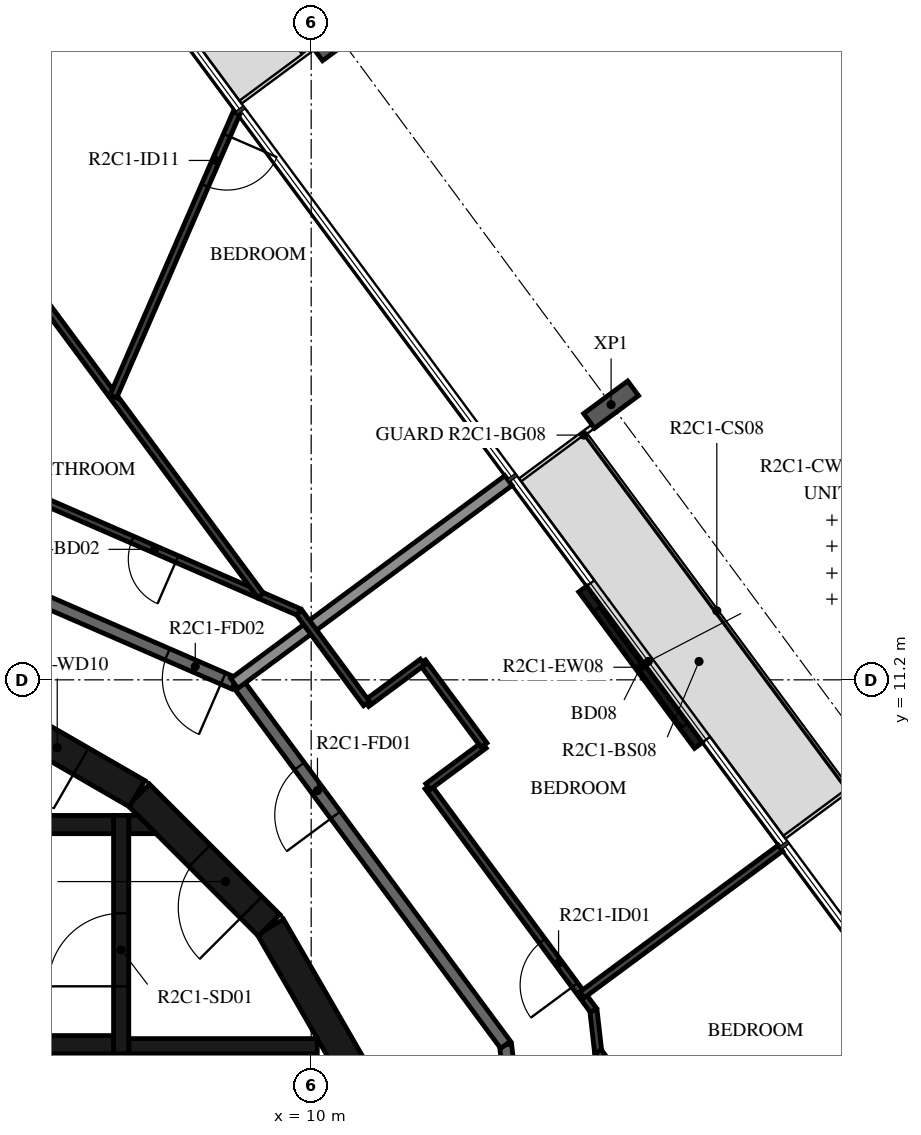
"""IFC4 building model, lengths in metres.
Left out: names, types, materials, properties, quantities, classifications, styles, units other than length and angle.
Written with IfcOpenShell. Run it as: python <this file> out.ifc"""

import sys

from ifc_helpers import new_model, si_unit, direction, frame, frame_2d, origin, origin_2d, place, context, subcontext, project, spatial, polyline, rectangle, i_section, outline, extrude, element, fill, save


model = new_model("IFC4")
c1 = context("Model", 3, precision=1e-05, world=origin(), true_north=direction((0.0, 1.0)))
c2 = subcontext(c1, "Body", "Model", "MODEL_VIEW")
j1 = project(units=[si_unit("LENGTHUNIT", "METRE"), si_unit("PLANEANGLEUNIT", "RADIAN")], contexts=[c1])
p1 = place(None, origin())
s1 = spatial("IfcSite", under=j1, at=p1, CompositionType="ELEMENT")
p2 = place(p1, origin())
s2 = spatial("IfcBuilding", under=s1, at=p2, CompositionType="ELEMENT")
p3 = place(p2, frame((0.0, 0.0, 101.2)))
s3 = spatial("IfcBuildingStorey", under=s2, at=p3, CompositionType="ELEMENT", Elevation=101.2)
for number, where, z_axis, x_axis in (
    (1, (14.932, 15.726, -0.38), (0.0, 0.0, 1.0), (0.595, -0.804, 0.0)),
    (2, (10.46, 21.77, -0.38), (0.0, 0.0, 1.0), (0.595, -0.804, 0.0)),
):
    element("IfcColumn", number, at=place(p3, frame(where, z_axis=z_axis, x_axis=x_axis)), inside=s3, PredefinedType="COLUMN", context=c2, shape_type="SweptSolid", body=[
        extrude(i_section(OverallWidth=0.3, OverallDepth=0.9, WebThickness=0.019, FlangeThickness=0.035, FilletRadius=0.03, at=origin_2d()), origin(), (0.0, 0.0, 1.0), 3.5),
    ])
p4 = place(p3, frame((16.368, 10.121, 0.0), z_axis=(0.0, 0.0, 1.0), x_axis=(-0.594811452818, 0.803865247163, 0.0)))
e3 = element("IfcWall", 3, at=p4, inside=s3, PredefinedType="STANDARD", context=c2, shape_type="SweptSolid", body=[
    extrude(rectangle(XDim=3.2, YDim=0.16, at=frame_2d((1.6, 0.0))), origin(), (0.0, 0.0, 1.0), 3.12),
])
p5 = place(p4, frame((0.4, 0.0, 0.0)))
e4 = element("IfcOpeningElement", 4, at=p5, cuts=e3, PredefinedType="OPENING", context=c2, shape_type="SweptSolid", body=[
    extrude(rectangle(XDim=2.4, YDim=2.4, at=frame_2d((1.2, 1.2))), frame((0.0, 0.09, 0.0), z_axis=(0.0, -1.0, 0.0), x_axis=(1.0, 0.0, 0.0)), (0.0, 0.0, 1.0), 0.18),
])
p6 = place(p3, frame((10.845, 4.51, 0.0), z_axis=(0.0, 0.0, 1.0), x_axis=(-0.500087131594, 0.865975092491, 0.0)))
e5 = element("IfcWall", 5, at=p6, inside=s3, PredefinedType="SHEAR", context=c2, shape_type="SweptSolid", body=[
    extrude(rectangle(XDim=3.033, YDim=0.5, at=frame_2d((1.516, 0.0))), origin(), (0.0, 0.0, 1.0), 3.12),
])
p7 = place(p3, frame((9.308, 7.164, 0.0), z_axis=(0.0, 0.0, 1.0), x_axis=(-0.707106781187, 0.707106781187, 0.0)))
e6 = element("IfcWall", 6, at=p7, inside=s3, PredefinedType="SHEAR", context=c2, shape_type="SweptSolid", body=[
    extrude(rectangle(XDim=3.032, YDim=0.5, at=frame_2d((1.516, 0.0))), origin(), (0.0, 0.0, 1.0), 3.12),
])
p8 = place(p7, frame((0.416, 0.0, 0.0)))
e7 = element("IfcOpeningElement", 7, at=p8, cuts=e6, PredefinedType="OPENING", context=c2, shape_type="SweptSolid", body=[
    extrude(rectangle(XDim=1.2, YDim=2.1, at=frame_2d((0.6, 1.05))), frame((0.0, 0.26, 0.0), z_axis=(0.0, -1.0, 0.0), x_axis=(1.0, 0.0, 0.0)), (0.0, 0.0, 1.0), 0.52),
])
p9 = place(p3, frame((7.137, 9.329, 0.0), z_axis=(0.0, 0.0, 1.0), x_axis=(-0.865975092491, 0.500087131594, 0.0)))
e8 = element("IfcWall", 8, at=p9, inside=s3, PredefinedType="SHEAR", context=c2, shape_type="SweptSolid", body=[
    extrude(rectangle(XDim=3.033, YDim=0.5, at=frame_2d((1.516, 0.0))), origin(), (0.0, 0.0, 1.0), 3.12),
])
p10 = place(p9, frame((1.066, 0.0, 0.0)))
e9 = element("IfcOpeningElement", 9, at=p10, cuts=e8, PredefinedType="OPENING", context=c2, shape_type="SweptSolid", body=[
    extrude(rectangle(XDim=0.9, YDim=2.1, at=frame_2d((0.45, 1.05))), frame((0.0, 0.26, 0.0), z_axis=(0.0, -1.0, 0.0), x_axis=(1.0, 0.0, 0.0)), (0.0, 0.0, 1.0), 0.52),
])
for number, where, z_axis, x_axis in (
    (10, (0.0, 5.2, 0.0), (0.0, 0.0, 1.0), (1.0, 0.0, 0.0)),
    (11, (0.0, 8.82, 0.0), (0.0, 0.0, 1.0), (1.0, 0.0, 0.0)),
):
    element("IfcWall", number, at=place(p3, frame(where, z_axis=z_axis, x_axis=x_axis)), inside=s3, PredefinedType="SHEAR", context=c2, shape_type="SweptSolid", body=[
        extrude(rectangle(XDim=6.75, YDim=0.3, at=frame_2d((3.375, 0.0))), origin(), (0.0, 0.0, 1.0), 3.12),
    ])
p11 = place(p3, frame((6.875, 5.05, 0.0), z_axis=(0.0, 0.0, 1.0), x_axis=(0.0, 1.0, 0.0)))
e12 = element("IfcWall", 12, at=p11, inside=s3, PredefinedType="SHEAR", context=c2, shape_type="SweptSolid", body=[
    extrude(rectangle(XDim=3.92, YDim=0.25, at=frame_2d((1.96, 0.0))), origin(), (0.0, 0.0, 1.0), 3.12),
])
p12 = place(p11, frame((1.11, 0.0, 0.0)))
e13 = element("IfcOpeningElement", 13, at=p12, cuts=e12, PredefinedType="OPENING", context=c2, shape_type="SweptSolid", body=[
    extrude(rectangle(XDim=1.2, YDim=2.1, at=frame_2d((0.6, 1.05))), frame((0.0, 0.135, 0.0), z_axis=(0.0, -1.0, 0.0), x_axis=(1.0, 0.0, 0.0)), (0.0, 0.0, 1.0), 0.27),
])
p13 = place(p3, frame((7.0, 5.175, 0.0), z_axis=(0.0, 0.0, 1.0), x_axis=(1.0, 0.0, 0.0)))
e14 = element("IfcWall", 14, at=p13, inside=s3, PredefinedType="SHEAR", context=c2, shape_type="SweptSolid", body=[
    extrude(rectangle(XDim=3.1, YDim=0.25, at=frame_2d((1.55, 0.0))), origin(), (0.0, 0.0, 1.0), 3.12),
])
p14 = place(p3, origin())
e15 = element("IfcWall", 15, at=p14, inside=s3, PredefinedType="SHEAR", context=c2, shape_type="SweptSolid", body=[
    extrude(outline(polyline([(7.448, 8.67), (7.0, 8.67), (7.0, 8.97), (7.148, 8.97), (7.448, 8.67)])), origin(), (0.0, 0.0, 1.0), 3.12),
])
p15 = place(p3, origin())
e16 = element("IfcWall", 16, at=p15, inside=s3, PredefinedType="SHEAR", context=c2, shape_type="SweptSolid", body=[
    extrude(outline(polyline([(-9.55, 4.8), (-7.65, 4.8), (-7.65, 1.9), (-7.4, 1.9), (-7.4, 4.8), (-5.5, 4.8), (-5.5, 1.9), (-5.25, 1.9), (-5.25, 4.8), (-3.35, 4.8), (-3.35, 1.9), (-3.1, 1.9), (-3.1, 4.8), (-1.2, 4.8), (-1.2, 1.9), (-0.95, 1.9), (-0.95, 4.8), (0.95, 4.8), (0.95, 1.9), (1.2, 1.9), (1.2, 4.8), (3.1, 4.8), (3.1, 1.9), (3.35, 1.9), (3.35, 4.8), (5.25, 4.8), (5.25, 1.9), (5.5, 1.9), (5.5, 4.8), (7.4, 4.8), (7.4, 1.9), (7.65, 1.9), (7.65, 4.8), (9.55, 4.8), (9.55, 1.9), (9.8, 1.9), (9.8, 4.8), (9.8, 5.05), (-9.8, 5.05), (-9.8, 4.8), (-9.8, 1.9), (-9.55, 1.9), (-9.55, 4.8)])), origin(), (0.0, 0.0, 1.0), 3.12),
])
p16 = place(p3, frame((14.028, -2.096, 0.0), z_axis=(0.0, 0.0, 1.0), x_axis=(-0.113226782163, 0.993569170114, 0.0)))
e17 = element("IfcWall", 17, at=p16, inside=s3, PredefinedType="STANDARD", context=c2, shape_type="SweptSolid", body=[
    extrude(rectangle(XDim=7.342, YDim=0.2, at=frame_2d((3.671, 0.0))), origin(), (0.0, 0.0, 1.0), 3.12),
])
p17 = place(p3, frame((13.196, 5.198, 0.0), z_axis=(0.0, 0.0, 1.0), x_axis=(-0.594805187394, 0.803869883159, 0.0)))
e18 = element("IfcWall", 18, at=p17, inside=s3, PredefinedType="STANDARD", context=c2, shape_type="SweptSolid", body=[
    extrude(rectangle(XDim=7.342, YDim=0.2, at=frame_2d((3.671, 0.0))), origin(), (0.0, 0.0, 1.0), 3.12),
])
p18 = place(p17, frame((4.7, 0.0, 0.0)))
e19 = element("IfcOpeningElement", 19, at=p18, cuts=e18, PredefinedType="OPENING", context=c2, shape_type="SweptSolid", body=[
    extrude(rectangle(XDim=1.0, YDim=2.1, at=frame_2d((0.5, 1.05))), frame((0.0, 0.11, 0.0), z_axis=(0.0, -1.0, 0.0), x_axis=(1.0, 0.0, 0.0)), (0.0, 0.0, 1.0), 0.22),
])
p19 = place(p3, frame((8.736, 11.141, 0.0), z_axis=(0.0, 0.0, 1.0), x_axis=(-0.917051290697, 0.398769269416, 0.0)))
e20 = element("IfcWall", 20, at=p19, inside=s3, PredefinedType="STANDARD", context=c2, shape_type="SweptSolid", body=[
    extrude(rectangle(XDim=7.24, YDim=0.2, at=frame_2d((3.62, 0.0))), origin(), (0.0, 0.0, 1.0), 3.12),
])
p20 = place(p19, frame((0.2, 0.0, 0.0)))
e21 = element("IfcOpeningElement", 21, at=p20, cuts=e20, PredefinedType="OPENING", context=c2, shape_type="SweptSolid", body=[
    extrude(rectangle(XDim=1.0, YDim=2.1, at=frame_2d((0.5, 1.05))), frame((0.0, 0.11, 0.0), z_axis=(0.0, -1.0, 0.0), x_axis=(1.0, 0.0, 0.0)), (0.0, 0.0, 1.0), 0.22),
])
p21 = place(p3, frame((13.244, 14.477, 0.0), z_axis=(0.0, 0.0, 1.0), x_axis=(-0.803853971109, -0.594826691677, 0.0)))
e22 = element("IfcWall", 22, at=p21, inside=s3, PredefinedType="STANDARD", context=c2, shape_type="SweptSolid", body=[
    extrude(rectangle(XDim=5.609, YDim=0.2, at=frame_2d((2.804, 0.0))), origin(), (0.0, 0.0, 1.0), 2.73),
])
p22 = place(p3, frame((15.563, -2.326, 0.0), z_axis=(0.0, 0.0, 1.0), x_axis=(-0.11320423706, 0.993571739087, 0.0)))
e23 = element("IfcWall", 23, at=p22, inside=s3, PredefinedType="PARTITIONING", context=c2, shape_type="SweptSolid", body=[
    extrude(rectangle(XDim=8.146, YDim=0.12, at=frame_2d((4.073, 0.0))), origin(), (0.0, 0.0, 1.0), 3.12),
])
p23 = place(p22, frame((0.97, 0.0, 0.0)))
e24 = element("IfcOpeningElement", 24, at=p23, cuts=e23, PredefinedType="OPENING", context=c2, shape_type="SweptSolid", body=[
    extrude(rectangle(XDim=0.8, YDim=2.1, at=frame_2d((0.4, 1.05))), frame((0.0, 0.07, 0.0), z_axis=(0.0, -1.0, 0.0), x_axis=(1.0, 0.0, 0.0)), (0.0, 0.0, 1.0), 0.14),
])
p24 = place(p3, frame((14.641, 5.767, 0.0), z_axis=(0.0, 0.0, 1.0), x_axis=(-0.594785744505, 0.803884269117, 0.0)))
e25 = element("IfcWall", 25, at=p24, inside=s3, PredefinedType="PARTITIONING", context=c2, shape_type="SweptSolid", body=[
    extrude(rectangle(XDim=4.573, YDim=0.12, at=frame_2d((2.287, 0.0))), origin(), (0.0, 0.0, 1.0), 3.12),
])
p25 = place(p24, frame((0.513, 0.0, 0.0)))
e26 = element("IfcOpeningElement", 26, at=p25, cuts=e25, PredefinedType="OPENING", context=c2, shape_type="SweptSolid", body=[
    extrude(rectangle(XDim=0.9, YDim=2.1, at=frame_2d((0.45, 1.05))), frame((0.0, 0.07, 0.0), z_axis=(0.0, -1.0, 0.0), x_axis=(1.0, 0.0, 0.0)), (0.0, 0.0, 1.0), 0.14),
])
p26 = place(p3, frame((11.921, 9.444, 0.0), z_axis=(0.0, 0.0, 1.0), x_axis=(0.803768532163, 0.594942137274, 0.0)))
e27 = element("IfcWall", 27, at=p26, inside=s3, PredefinedType="PARTITIONING", context=c2, shape_type="SweptSolid", body=[
    extrude(rectangle(XDim=1.146, YDim=0.12, at=frame_2d((0.573, 0.0))), origin(), (0.0, 0.0, 1.0), 3.12),
])
p27 = place(p3, frame((12.842, 10.125, 0.0), z_axis=(0.0, 0.0, 1.0), x_axis=(-0.594770612735, 0.803895464738, 0.0)))
e28 = element("IfcWall", 28, at=p27, inside=s3, PredefinedType="PARTITIONING", context=c2, shape_type="SweptSolid", body=[
    extrude(rectangle(XDim=1.7, YDim=0.12, at=frame_2d((0.85, 0.0))), origin(), (0.0, 0.0, 1.0), 3.12),
])
p28 = place(p3, frame((11.831, 11.492, 0.0), z_axis=(0.0, 0.0, 1.0), x_axis=(-0.803843936653, -0.59484025209, 0.0)))
e29 = element("IfcWall", 29, at=p28, inside=s3, PredefinedType="PARTITIONING", context=c2, shape_type="SweptSolid", body=[
    extrude(rectangle(XDim=1.146, YDim=0.12, at=frame_2d((0.573, 0.0))), origin(), (0.0, 0.0, 1.0), 3.12),
])
p29 = place(p3, frame((10.91, 10.81, 0.0), z_axis=(0.0, 0.0, 1.0), x_axis=(-0.59489693125, 0.803801991282, 0.0)))
e30 = element("IfcWall", 30, at=p29, inside=s3, PredefinedType="PARTITIONING", context=c2, shape_type="SweptSolid", body=[
    extrude(rectangle(XDim=1.872, YDim=0.12, at=frame_2d((0.936, 0.0))), origin(), (0.0, 0.0, 1.0), 3.12),
])
p30 = place(p3, frame((21.842, -4.54, 0.0), z_axis=(0.0, 0.0, 1.0), x_axis=(-0.59481744951, 0.803860809941, 0.0)))
e31 = element("IfcWall", 31, at=p30, inside=s3, PredefinedType="PARTITIONING", context=c2, shape_type="SweptSolid", body=[
    extrude(rectangle(XDim=11.976, YDim=0.12, at=frame_2d((5.988, 0.0))), origin(), (0.0, 0.0, 1.0), 3.12),
])
p31 = place(p30, frame((0.6, 0.0, 0.0)))
e32 = element("IfcOpeningElement", 32, at=p31, cuts=e31, PredefinedType="OPENING", context=c2, shape_type="SweptSolid", body=[
    extrude(rectangle(XDim=0.9, YDim=2.1, at=frame_2d((0.45, 1.05))), frame((0.0, 0.07, 0.0), z_axis=(0.0, -1.0, 0.0), x_axis=(1.0, 0.0, 0.0)), (0.0, 0.0, 1.0), 0.14),
])
p32 = place(p3, frame((17.717, 8.433, 0.0), z_axis=(0.0, 0.0, 1.0), x_axis=(-0.803853407146, -0.594827453821, 0.0)))
e33 = element("IfcWall", 33, at=p32, inside=s3, PredefinedType="PARTITIONING", context=c2, shape_type="SweptSolid", body=[
    extrude(rectangle(XDim=4.058, YDim=0.12, at=frame_2d((2.029, 0.0))), origin(), (0.0, 0.0, 1.0), 2.73),
])
p33 = place(p3, frame((9.796, 12.315, 0.0), z_axis=(0.0, 0.0, 1.0), x_axis=(-0.917059572812, 0.398750222463, 0.0)))
e34 = element("IfcWall", 34, at=p33, inside=s3, PredefinedType="PARTITIONING", context=c2, shape_type="SweptSolid", body=[
    extrude(rectangle(XDim=8.146, YDim=0.12, at=frame_2d((4.073, 0.0))), origin(), (0.0, 0.0, 1.0), 3.12),
])
p34 = place(p33, frame((2.185, 0.0, 0.0)))
e35 = element("IfcOpeningElement", 35, at=p34, cuts=e34, PredefinedType="OPENING", context=c2, shape_type="SweptSolid", body=[
    extrude(rectangle(XDim=0.8, YDim=2.1, at=frame_2d((0.4, 1.05))), frame((0.0, 0.07, 0.0), z_axis=(0.0, -1.0, 0.0), x_axis=(1.0, 0.0, 0.0)), (0.0, 0.0, 1.0), 0.14),
])
p35 = place(p3, frame((0.498, 24.306, 0.0), z_axis=(0.0, 0.0, 1.0), x_axis=(0.594826122019, -0.803854392639, 0.0)))
e36 = element("IfcWall", 36, at=p35, inside=s3, PredefinedType="PARTITIONING", context=c2, shape_type="SweptSolid", body=[
    extrude(rectangle(XDim=14.576, YDim=0.12, at=frame_2d((7.288, 0.0))), origin(), (0.0, 0.0, 1.0), 3.12),
])
p36 = place(p35, frame((2.841, 0.0, 0.0)))
e37 = element("IfcOpeningElement", 37, at=p36, cuts=e36, PredefinedType="OPENING", context=c2, shape_type="SweptSolid", body=[
    extrude(rectangle(XDim=0.9, YDim=2.1, at=frame_2d((0.45, 1.05))), frame((0.0, 0.07, 0.0), z_axis=(0.0, -1.0, 0.0), x_axis=(1.0, 0.0, 0.0)), (0.0, 0.0, 1.0), 0.14),
])
p37 = place(p35, frame((0.605, 0.0, 0.0)))
e38 = element("IfcOpeningElement", 38, at=p37, cuts=e36, PredefinedType="OPENING", context=c2, shape_type="SweptSolid", body=[
    extrude(rectangle(XDim=0.9, YDim=2.1, at=frame_2d((0.45, 1.05))), frame((0.0, 0.07, 0.0), z_axis=(0.0, -1.0, 0.0), x_axis=(1.0, 0.0, 0.0)), (0.0, 0.0, 1.0), 0.14),
])
p38 = place(p3, frame((8.772, 20.521, 0.0), z_axis=(0.0, 0.0, 1.0), x_axis=(-0.398733139635, -0.917067000473, 0.0)))
e39 = element("IfcWall", 39, at=p38, inside=s3, PredefinedType="PARTITIONING", context=c2, shape_type="SweptSolid", body=[
    extrude(rectangle(XDim=5.081, YDim=0.12, at=frame_2d((2.541, 0.0))), origin(), (0.0, 0.0, 1.0), 3.12),
])
p39 = place(p38, frame((0.4, 0.0, 0.0)))
e40 = element("IfcOpeningElement", 40, at=p39, cuts=e39, PredefinedType="OPENING", context=c2, shape_type="SweptSolid", body=[
    extrude(rectangle(XDim=0.9, YDim=2.1, at=frame_2d((0.45, 1.05))), frame((0.0, 0.07, 0.0), z_axis=(0.0, -1.0, 0.0), x_axis=(1.0, 0.0, 0.0)), (0.0, 0.0, 1.0), 0.14),
])
p40 = place(p5, origin())
e41 = element("IfcDoor", 41, at=p40, inside=s3, OperationType="DOUBLE_DOOR_SLIDING", PredefinedType="DOOR", context=c2, shape_type="SweptSolid", body=[
    extrude(rectangle(XDim=2.4, YDim=2.4, at=frame_2d((1.2, 1.2))), frame((0.0, 0.025, 0.0), z_axis=(0.0, -1.0, 0.0), x_axis=(1.0, 0.0, 0.0)), (0.0, 0.0, 1.0), 0.05),
])
fill(e4, e41)
p41 = place(p12, origin())
e42 = element("IfcDoor", 42, at=p41, inside=s3, OperationType="SINGLE_SWING_LEFT", PredefinedType="DOOR", context=c2, shape_type="SweptSolid", body=[
    extrude(rectangle(XDim=1.2, YDim=2.1, at=frame_2d((0.6, 1.05))), frame((0.0, 0.025, 0.0), z_axis=(0.0, -1.0, 0.0), x_axis=(1.0, 0.0, 0.0)), (0.0, 0.0, 1.0), 0.05),
])
fill(e13, e42)
p42 = place(p8, origin())
e43 = element("IfcDoor", 43, at=p42, inside=s3, OperationType="SINGLE_SWING_RIGHT", PredefinedType="DOOR", context=c2, shape_type="SweptSolid", body=[
    extrude(rectangle(XDim=1.2, YDim=2.1, at=frame_2d((0.6, 1.05))), frame((0.0, 0.025, 0.0), z_axis=(0.0, -1.0, 0.0), x_axis=(1.0, 0.0, 0.0)), (0.0, 0.0, 1.0), 0.05),
])
fill(e7, e43)
p43 = place(p10, origin())
e44 = element("IfcDoor", 44, at=p43, inside=s3, OperationType="SINGLE_SWING_LEFT", PredefinedType="DOOR", context=c2, shape_type="SweptSolid", body=[
    extrude(rectangle(XDim=0.9, YDim=2.1, at=frame_2d((0.45, 1.05))), frame((0.0, 0.025, 0.0), z_axis=(0.0, -1.0, 0.0), x_axis=(1.0, 0.0, 0.0)), (0.0, 0.0, 1.0), 0.05),
])
fill(e9, e44)
p44 = place(p18, origin())
e45 = element("IfcDoor", 45, at=p44, inside=s3, OperationType="SINGLE_SWING_RIGHT", PredefinedType="DOOR", context=c2, shape_type="SweptSolid", body=[
    extrude(rectangle(XDim=1.0, YDim=2.1, at=frame_2d((0.5, 1.05))), frame((0.0, 0.025, 0.0), z_axis=(0.0, -1.0, 0.0), x_axis=(1.0, 0.0, 0.0)), (0.0, 0.0, 1.0), 0.05),
])
fill(e19, e45)
p45 = place(p25, origin())
e46 = element("IfcDoor", 46, at=p45, inside=s3, OperationType="SINGLE_SWING_LEFT", PredefinedType="DOOR", context=c2, shape_type="SweptSolid", body=[
    extrude(rectangle(XDim=0.9, YDim=2.1, at=frame_2d((0.45, 1.05))), frame((0.0, 0.025, 0.0), z_axis=(0.0, -1.0, 0.0), x_axis=(1.0, 0.0, 0.0)), (0.0, 0.0, 1.0), 0.05),
])
fill(e26, e46)
p46 = place(p20, origin())
e47 = element("IfcDoor", 47, at=p46, inside=s3, OperationType="SINGLE_SWING_RIGHT", PredefinedType="DOOR", context=c2, shape_type="SweptSolid", body=[
    extrude(rectangle(XDim=1.0, YDim=2.1, at=frame_2d((0.5, 1.05))), frame((0.0, 0.025, 0.0), z_axis=(0.0, -1.0, 0.0), x_axis=(1.0, 0.0, 0.0)), (0.0, 0.0, 1.0), 0.05),
])
fill(e21, e47)
p47 = place(p34, origin())
e48 = element("IfcDoor", 48, at=p47, inside=s3, OperationType="SINGLE_SWING_RIGHT", PredefinedType="DOOR", context=c2, shape_type="SweptSolid", body=[
    extrude(rectangle(XDim=0.8, YDim=2.1, at=frame_2d((0.4, 1.05))), frame((0.0, 0.025, 0.0), z_axis=(0.0, -1.0, 0.0), x_axis=(1.0, 0.0, 0.0)), (0.0, 0.0, 1.0), 0.05),
])
fill(e35, e48)
p48 = place(p39, origin())
e49 = element("IfcDoor", 49, at=p48, inside=s3, OperationType="SINGLE_SWING_LEFT", PredefinedType="DOOR", context=c2, shape_type="SweptSolid", body=[
    extrude(rectangle(XDim=0.9, YDim=2.1, at=frame_2d((0.45, 1.05))), frame((0.0, 0.025, 0.0), z_axis=(0.0, -1.0, 0.0), x_axis=(1.0, 0.0, 0.0)), (0.0, 0.0, 1.0), 0.05),
])
fill(e40, e49)
save(model, sys.argv[1])
